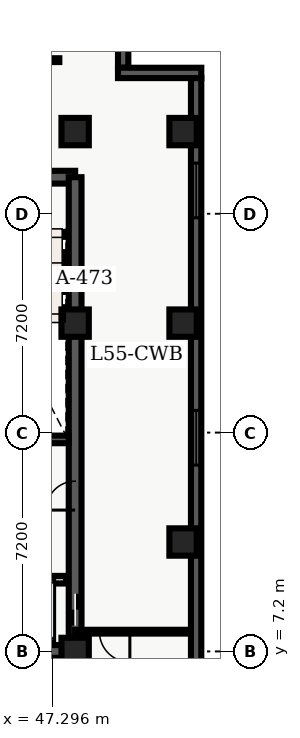
"""IFC4 building model, lengths in metres.
Left out: names, types, materials, properties, quantities, classifications, styles, units other than length and angle.
Written with IfcOpenShell. Run it as: python <this file> out.ifc"""

import sys

from ifc_helpers import new_model, entity, si_unit, converted_unit, direction, frame, origin_with_axes, origin_2d_with_axis, place, context, subcontext, project, spatial, polyline, rectangle, outline, extrude, element, fill, save


model = new_model("IFC4")
c1 = context("Model", 3, precision=1e-05, world=origin_with_axes(), true_north=direction((0.0, 1.0)))
c2 = subcontext(c1, "Body", "Model", "MODEL_VIEW")
j1 = project(units=[si_unit("LENGTHUNIT", "METRE"), converted_unit("PLANEANGLEUNIT", "DEGREE", entity("IfcPlaneAngleMeasure", 0.017), si_unit("PLANEANGLEUNIT", "RADIAN"), dimensions=[0, 0, 0, 0, 0, 0, 0])], contexts=[c1])
p1 = place(None, origin_with_axes())
s1 = spatial("IfcSite", under=j1, at=p1, CompositionType="ELEMENT")
p2 = place(p1, origin_with_axes())
s2 = spatial("IfcBuilding", under=s1, at=p2, CompositionType="ELEMENT")
p3 = place(p2, frame((0.0, 0.0, 224.7), z_axis=(0.0, 0.0, 1.0), x_axis=(1.0, 0.0, 0.0)))
s3 = spatial("IfcBuildingStorey", under=s2, at=p3, CompositionType="ELEMENT", Elevation=224.7)
p4 = place(p3, frame((40.2, 7.2, 0.0), z_axis=(0.0, 0.0, 1.0), x_axis=(1.0, 0.0, 0.0)))
e1 = element("IfcWall", 1, at=p4, inside=s3, PredefinedType="SHEAR", context=c2, shape_type="SweptSolid", body=[
    extrude(outline(polyline([(0.0, -0.21), (7.85, -0.21), (7.85, 0.21), (0.0, 0.21), (0.0, -0.21)])), origin_with_axes(), (0.0, 0.0, 1.0), 3.66),
])
p5 = place(p4, frame((2.175, 0.0, 0.0), z_axis=(0.0, 0.0, 1.0), x_axis=(1.0, 0.0, 0.0)))
e2 = element("IfcOpeningElement", 2, at=p5, cuts=e1, PredefinedType="OPENING", context=c2, shape_type="SweptSolid", body=[
    extrude(rectangle(XDim=1.05, YDim=0.44, at=origin_2d_with_axis()), origin_with_axes(), (0.0, 0.0, 1.0), 2.15),
])
p6 = place(p3, frame((40.2, 22.8, 0.0), z_axis=(0.0, 0.0, 1.0), x_axis=(1.0, 0.0, 0.0)))
e3 = element("IfcWall", 3, at=p6, inside=s3, PredefinedType="SHEAR", context=c2, shape_type="SweptSolid", body=[
    extrude(outline(polyline([(0.0, -0.21), (7.85, -0.21), (7.85, 0.21), (0.0, 0.21), (0.0, -0.21)])), origin_with_axes(), (0.0, 0.0, 1.0), 3.66),
])
p7 = place(p6, frame((5.775, 0.0, 0.0), z_axis=(0.0, 0.0, 1.0), x_axis=(1.0, 0.0, 0.0)))
e4 = element("IfcOpeningElement", 4, at=p7, cuts=e3, PredefinedType="OPENING", context=c2, shape_type="SweptSolid", body=[
    extrude(rectangle(XDim=1.05, YDim=0.44, at=origin_2d_with_axis()), origin_with_axes(), (0.0, 0.0, 1.0), 2.15),
])
p8 = place(p6, frame((2.15, 0.0, 0.0), z_axis=(0.0, 0.0, 1.0), x_axis=(1.0, 0.0, 0.0)))
e5 = element("IfcOpeningElement", 5, at=p8, cuts=e3, PredefinedType="OPENING", context=c2, shape_type="SweptSolid", body=[
    extrude(rectangle(XDim=0.9, YDim=0.44, at=origin_2d_with_axis()), origin_with_axes(), (0.0, 0.0, 1.0), 2.15),
])
p9 = place(p3, frame((48.05, 7.2, 0.0), z_axis=(0.0, 0.0, 1.0), x_axis=(0.0, 1.0, 0.0)))
e6 = element("IfcWall", 6, at=p9, inside=s3, PredefinedType="SHEAR", context=c2, shape_type="SweptSolid", body=[
    extrude(outline(polyline([(0.0, -0.21), (15.6, -0.21), (15.6, 0.21), (0.0, 0.21), (0.0, -0.21)])), origin_with_axes(), (0.0, 0.0, 1.0), 3.66),
])
p10 = place(p9, frame((1.375, 0.0, 0.0), z_axis=(0.0, 0.0, 1.0), x_axis=(1.0, 0.0, 0.0)))
e7 = element("IfcOpeningElement", 7, at=p10, cuts=e6, PredefinedType="OPENING", context=c2, shape_type="SweptSolid", body=[
    extrude(rectangle(XDim=1.05, YDim=0.44, at=origin_2d_with_axis()), origin_with_axes(), (0.0, 0.0, 1.0), 2.15),
])
p11 = place(p9, frame((5.125, 0.0, 0.0), z_axis=(0.0, 0.0, 1.0), x_axis=(1.0, 0.0, 0.0)))
e8 = element("IfcOpeningElement", 8, at=p11, cuts=e6, PredefinedType="OPENING", context=c2, shape_type="SweptSolid", body=[
    extrude(rectangle(XDim=0.95, YDim=0.44, at=origin_2d_with_axis()), origin_with_axes(), (0.0, 0.0, 1.0), 2.15),
])
p12 = place(p3, frame((44.25, 14.175, 0.0), z_axis=(0.0, 0.0, 1.0), x_axis=(1.0, 0.0, 0.0)))
e9 = element("IfcWall", 9, at=p12, inside=s3, PredefinedType="SHEAR", context=c2, shape_type="SweptSolid", body=[
    extrude(outline(polyline([(0.0, -0.125), (3.59, -0.125), (3.59, 0.125), (0.0, 0.125), (0.0, -0.125)])), origin_with_axes(), (0.0, 0.0, 1.0), 3.66),
])
for number, where, z_axis, x_axis in (
    (10, (48.05, 7.2, 0.0), (0.0, 0.0, 1.0), (1.0, 0.0, 0.0)),
    (11, (48.05, 18.0, 0.0), (0.0, 0.0, 1.0), (1.0, 0.0, 0.0)),
    (12, (48.05, 24.3, 0.0), (0.0, 0.0, 1.0), (1.0, 0.0, 0.0)),
    (13, (51.6, 10.8, 0.0), (0.0, 0.0, 1.0), (1.0, 0.0, 0.0)),
    (14, (51.6, 18.0, 0.0), (0.0, 0.0, 1.0), (1.0, 0.0, 0.0)),
    (15, (51.6, 24.3, 0.0), (0.0, 0.0, 1.0), (1.0, 0.0, 0.0)),
):
    element("IfcColumn", number, at=place(p3, frame(where, z_axis=z_axis, x_axis=x_axis)), inside=s3, PredefinedType="COLUMN", context=c2, shape_type="SweptSolid", body=[
        extrude(rectangle(XDim=0.9, YDim=0.9, at=origin_2d_with_axis()), origin_with_axes(), (0.0, 0.0, 1.0), 3.9),
    ])
p13 = place(p3, frame((44.25, 9.56, 0.0), z_axis=(0.0, 0.0, 1.0), x_axis=(1.0, 0.0, 0.0)))
e16 = element("IfcWall", 16, at=p13, inside=s3, PredefinedType="SOLIDWALL", context=c2, shape_type="SweptSolid", body=[
    extrude(outline(polyline([(0.0, -0.125), (3.5, -0.125), (3.5, 0.125), (0.0, 0.125), (0.0, -0.125)])), origin_with_axes(), (0.0, 0.0, 1.0), 2.7),
])
p14 = place(p3, frame((51.865, 7.85, 0.0), z_axis=(0.0, 0.0, 1.0), x_axis=(-1.0, 0.0, 0.0)))
e17 = element("IfcWall", 17, at=p14, inside=s3, PredefinedType="PARTITIONING", context=c2, shape_type="SweptSolid", body=[
    extrude(outline(polyline([(0.0, -0.062), (3.815, -0.062), (3.815, 0.062), (0.0, 0.062), (0.0, -0.062)])), origin_with_axes(), (0.0, 0.0, 1.0), 2.7),
])
p15 = place(p14, frame((2.515, 0.0, 0.0), z_axis=(0.0, 0.0, 1.0), x_axis=(1.0, 0.0, 0.0)))
e18 = element("IfcOpeningElement", 18, at=p15, cuts=e17, PredefinedType="OPENING", context=c2, shape_type="SweptSolid", body=[
    extrude(rectangle(XDim=1.0, YDim=0.145, at=origin_2d_with_axis()), origin_with_axes(), (0.0, 0.0, 1.0), 2.15),
])
p16 = place(p3, frame((36.335, 26.65, 0.0), z_axis=(0.0, 0.0, 1.0), x_axis=(1.0, 0.0, 0.0)))
e19 = element("IfcWall", 19, at=p16, inside=s3, PredefinedType="PARTITIONING", context=c2, shape_type="SweptSolid", body=[
    extrude(outline(polyline([(0.0, -0.062), (11.195, -0.062), (11.195, 0.062), (0.0, 0.062), (0.0, -0.062)])), origin_with_axes(), (0.0, 0.0, 1.0), 2.7),
])
p17 = place(p16, frame((6.665, 0.0, 0.0), z_axis=(0.0, 0.0, 1.0), x_axis=(1.0, 0.0, 0.0)))
e20 = element("IfcOpeningElement", 20, at=p17, cuts=e19, PredefinedType="OPENING", context=c2, shape_type="SweptSolid", body=[
    extrude(rectangle(XDim=1.0, YDim=0.145, at=origin_2d_with_axis()), origin_with_axes(), (0.0, 0.0, 1.0), 2.15),
])
p18 = place(p3, frame((49.63, 28.46, 0.0), z_axis=(0.0, 0.0, 1.0), x_axis=(0.0, -1.0, 0.0)))
e21 = element("IfcWall", 21, at=p18, inside=s3, PredefinedType="SOLIDWALL", context=c2, shape_type="SweptSolid", body=[
    extrude(outline(polyline([(0.0, -0.17), (2.06, -0.17), (2.06, 0.17), (0.0, 0.17), (0.0, -0.17)])), origin_with_axes(), (0.0, 0.0, 1.0), 3.66),
])
p19 = place(p3, frame((49.46, 26.23, 0.0), z_axis=(0.0, 0.0, 1.0), x_axis=(1.0, 0.0, 0.0)))
e22 = element("IfcWall", 22, at=p19, inside=s3, PredefinedType="SOLIDWALL", context=c2, shape_type="SweptSolid", body=[
    extrude(outline(polyline([(0.0, -0.17), (2.74, -0.17), (2.74, 0.17), (0.0, 0.17), (0.0, -0.17)])), origin_with_axes(), (0.0, 0.0, 1.0), 3.66),
])
p20 = place(p3, frame((52.03, 26.06, 0.0), z_axis=(0.0, 0.0, 1.0), x_axis=(0.0, -1.0, 0.0)))
e23 = element("IfcWall", 23, at=p20, inside=s3, PredefinedType="SOLIDWALL", context=c2, shape_type="SweptSolid", body=[
    extrude(outline(polyline([(0.0, -0.17), (23.66, -0.17), (23.66, 0.17), (0.0, 0.17), (0.0, -0.17)])), origin_with_axes(), (0.0, 0.0, 1.0), 3.66),
])
p21 = place(p20, frame((3.696, 0.0, 0.45), z_axis=(0.0, 0.0, 1.0), x_axis=(1.0, 0.0, 0.0)))
e24 = element("IfcOpeningElement", 24, at=p21, cuts=e23, PredefinedType="OPENING", context=c2, shape_type="SweptSolid", body=[
    extrude(rectangle(XDim=1.8, YDim=0.36, at=origin_2d_with_axis()), origin_with_axes(), (0.0, 0.0, 1.0), 2.1),
])
p22 = place(p20, frame((11.83, 0.0, 0.45), z_axis=(0.0, 0.0, 1.0), x_axis=(1.0, 0.0, 0.0)))
e25 = element("IfcOpeningElement", 25, at=p22, cuts=e23, PredefinedType="OPENING", context=c2, shape_type="SweptSolid", body=[
    extrude(rectangle(XDim=1.8, YDim=0.36, at=origin_2d_with_axis()), origin_with_axes(), (0.0, 0.0, 1.0), 2.1),
])
p23 = place(p20, frame((20.364, 0.0, 0.45), z_axis=(0.0, 0.0, 1.0), x_axis=(1.0, 0.0, 0.0)))
e26 = element("IfcOpeningElement", 26, at=p23, cuts=e23, PredefinedType="OPENING", context=c2, shape_type="SweptSolid", body=[
    extrude(rectangle(XDim=1.8, YDim=0.36, at=origin_2d_with_axis()), origin_with_axes(), (0.0, 0.0, 1.0), 2.1),
])
p24 = place(p9, frame((1.375, 0.0, 0.0), z_axis=(0.0, 0.0, 1.0), x_axis=(1.0, 0.0, 0.0)))
e27 = element("IfcDoor", 27, at=p24, inside=s3, OperationType="SLIDING_TO_LEFT", PredefinedType="DOOR", context=c2, shape_type="SweptSolid", body=[
    extrude(rectangle(XDim=1.05, YDim=0.09, at=origin_2d_with_axis()), origin_with_axes(), (0.0, 0.0, 1.0), 2.15),
])
fill(e7, e27)
p25 = place(p9, frame((5.125, 0.0, 0.0), z_axis=(0.0, 0.0, 1.0), x_axis=(1.0, 0.0, 0.0)))
e28 = element("IfcDoor", 28, at=p25, inside=s3, OperationType="SINGLE_SWING_LEFT", PredefinedType="DOOR", context=c2, shape_type="SweptSolid", body=[
    extrude(rectangle(XDim=0.95, YDim=0.09, at=origin_2d_with_axis()), origin_with_axes(), (0.0, 0.0, 1.0), 2.15),
])
fill(e8, e28)
p26 = place(p14, frame((2.515, 0.0, 0.0), z_axis=(0.0, 0.0, 1.0), x_axis=(1.0, 0.0, 0.0)))
e29 = element("IfcDoor", 29, at=p26, inside=s3, OperationType="SINGLE_SWING_LEFT", PredefinedType="DOOR", context=c2, shape_type="SweptSolid", body=[
    extrude(rectangle(XDim=1.0, YDim=0.075, at=origin_2d_with_axis()), origin_with_axes(), (0.0, 0.0, 1.0), 2.15),
])
fill(e18, e29)
p27 = place(p20, frame((3.696, 0.0, 0.45), z_axis=(0.0, 0.0, 1.0), x_axis=(1.0, 0.0, 0.0)))
e30 = element("IfcWindow", 30, at=p27, inside=s3, PredefinedType="WINDOW", context=c2, shape_type="SweptSolid", body=[
    extrude(rectangle(XDim=1.8, YDim=0.09, at=origin_2d_with_axis()), origin_with_axes(), (0.0, 0.0, 1.0), 2.1),
])
fill(e24, e30)
p28 = place(p20, frame((11.83, 0.0, 0.45), z_axis=(0.0, 0.0, 1.0), x_axis=(1.0, 0.0, 0.0)))
e31 = element("IfcWindow", 31, at=p28, inside=s3, PredefinedType="WINDOW", context=c2, shape_type="SweptSolid", body=[
    extrude(rectangle(XDim=1.8, YDim=0.09, at=origin_2d_with_axis()), origin_with_axes(), (0.0, 0.0, 1.0), 2.1),
])
fill(e25, e31)
save(model, sys.argv[1])
